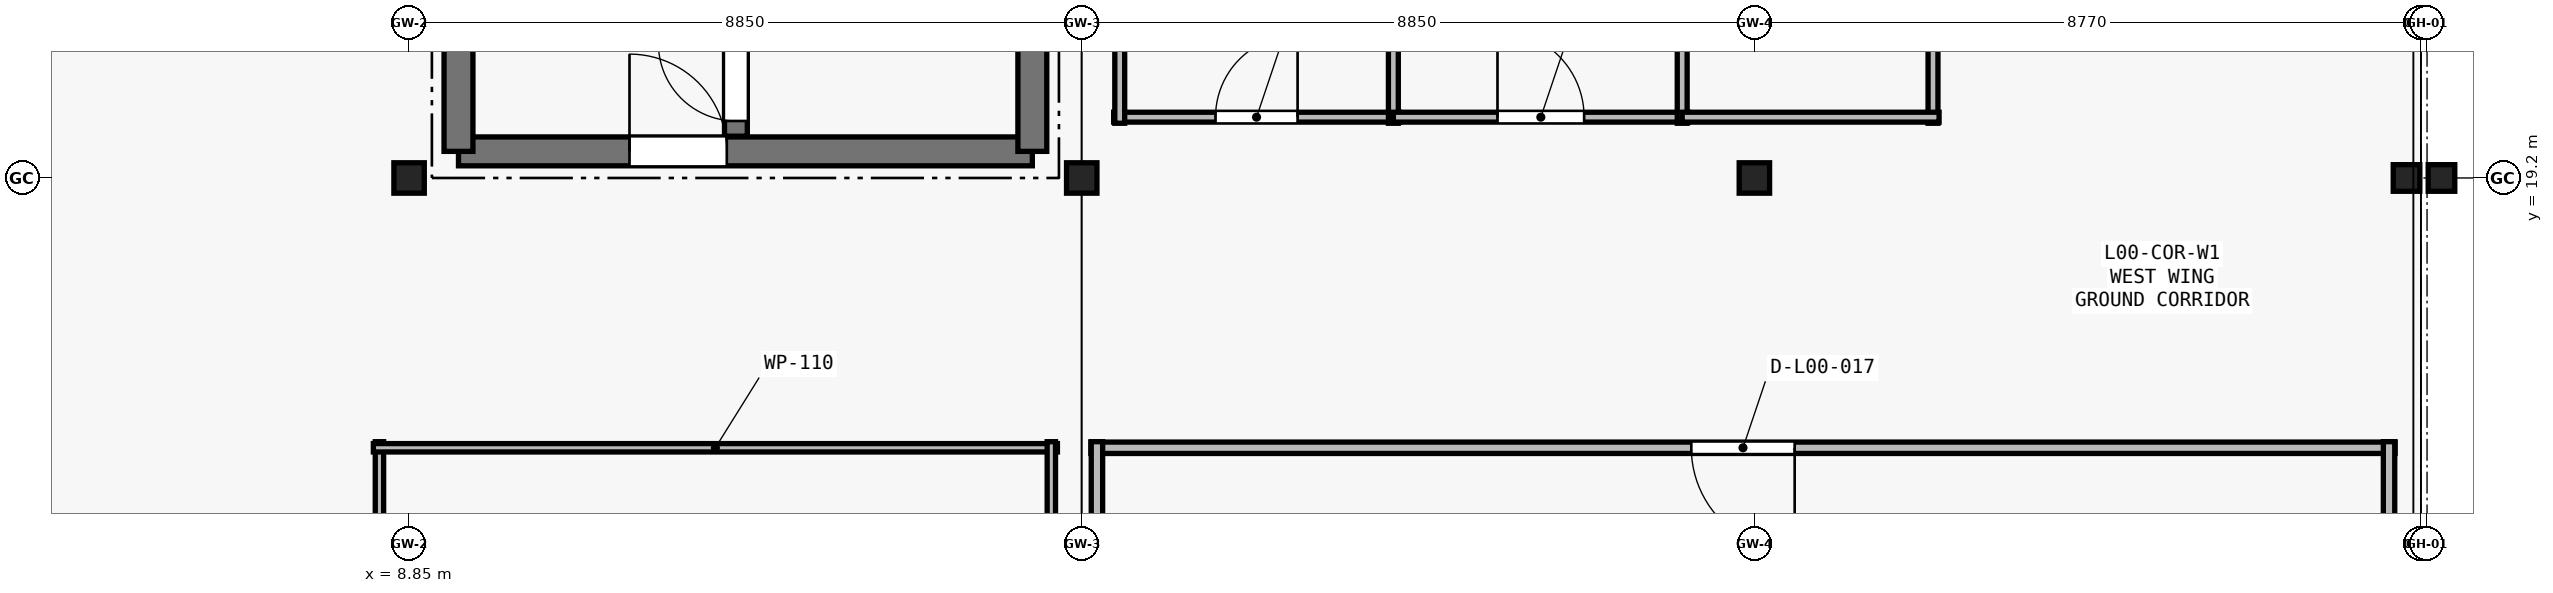
"""IFC4 building model, lengths in metres.
Left out: names, types, materials, properties, quantities, classifications, styles, units other than length and angle.
Written with IfcOpenShell. Run it as: python <this file> out.ifc"""

import sys

from ifc_helpers import new_model, si_unit, direction, frame, frame_2d, origin, origin_2d, place, context, subcontext, project, spatial, rectangle, i_section, extrude, element, fill, save


model = new_model("IFC4")
c1 = context("Model", 3, precision=1e-05, world=origin(), true_north=direction((0.0, 1.0)))
c2 = subcontext(c1, "Body", "Model", "MODEL_VIEW")
j1 = project(units=[si_unit("LENGTHUNIT", "METRE"), si_unit("PLANEANGLEUNIT", "RADIAN")], contexts=[c1])
p1 = place(None, origin())
s1 = spatial("IfcSite", under=j1, at=p1, CompositionType="ELEMENT")
p2 = place(p1, origin())
s2 = spatial("IfcBuilding", under=s1, at=p2, CompositionType="ELEMENT")
p3 = place(p2, origin())
s3 = spatial("IfcBuildingStorey", under=s2, at=p3, CompositionType="ELEMENT", Elevation=0.0)
for number, where, z_axis, x_axis in (
    (1, (8.85, 19.2, 0.0), (0.0, 0.0, 1.0), (1.0, 0.0, 0.0)),
    (2, (17.7, 19.2, 0.0), (0.0, 0.0, 1.0), (1.0, 0.0, 0.0)),
    (3, (26.55, 19.2, 0.0), (0.0, 0.0, 1.0), (1.0, 0.0, 0.0)),
):
    element("IfcColumn", number, at=place(p3, frame(where, z_axis=z_axis, x_axis=x_axis)), inside=s3, PredefinedType="COLUMN", context=c2, shape_type="SweptSolid", body=[
        extrude(i_section(OverallWidth=0.4, OverallDepth=0.4, WebThickness=0.013, FlangeThickness=0.021, FilletRadius=0.022, at=origin_2d()), origin(), (0.0, 0.0, 1.0), 6.0),
    ])
for number, where, z_axis, x_axis in (
    (4, (35.13, 19.2, 0.0), (0.0, 0.0, 1.0), (1.0, 0.0, 0.0)),
    (5, (35.59, 19.2, 0.0), (0.0, 0.0, 1.0), (1.0, 0.0, 0.0)),
):
    element("IfcColumn", number, at=place(p3, frame(where, z_axis=z_axis, x_axis=x_axis)), inside=s3, PredefinedType="COLUMN", context=c2, shape_type="SweptSolid", body=[
        extrude(i_section(OverallWidth=0.35, OverallDepth=0.35, WebThickness=0.012, FlangeThickness=0.019, FilletRadius=0.02, at=origin_2d()), origin(), (0.0, 0.0, 1.0), 6.0),
    ])
p4 = place(p3, frame((9.5, 19.55, 0.0), z_axis=(0.0, 0.0, 1.0), x_axis=(1.0, 0.0, 0.0)))
e6 = element("IfcWall", 6, at=p4, inside=s3, PredefinedType="SHEAR", context=c2, shape_type="SweptSolid", body=[
    extrude(rectangle(XDim=7.55, YDim=0.38, at=frame_2d((3.775, 0.0))), origin(), (0.0, 0.0, 1.0), 6.0),
])
p5 = place(p4, frame((2.25, 0.0, 0.0)))
e7 = element("IfcOpeningElement", 7, at=p5, cuts=e6, PredefinedType="OPENING", context=c2, shape_type="SweptSolid", body=[
    extrude(rectangle(XDim=1.28, YDim=2.15, at=frame_2d((0.64, 1.075))), frame((0.0, 0.2, 0.0), z_axis=(0.0, -1.0, 0.0), x_axis=(1.0, 0.0, 0.0)), (0.0, 0.0, 1.0), 0.4),
])
for number, where, z_axis, x_axis in (
    (8, (9.5, 28.35, 0.0), (0.0, 0.0, 1.0), (0.0, -1.0, 0.0)),
    (9, (17.05, 19.55, 0.0), (0.0, 0.0, 1.0), (0.0, 1.0, 0.0)),
):
    element("IfcWall", number, at=place(p3, frame(where, z_axis=z_axis, x_axis=x_axis)), inside=s3, PredefinedType="SHEAR", context=c2, shape_type="SweptSolid", body=[
        extrude(rectangle(XDim=8.8, YDim=0.38, at=frame_2d((4.4, 0.0))), origin(), (0.0, 0.0, 1.0), 6.0),
    ])
p6 = place(p3, frame((13.15, 19.75, 0.0), z_axis=(0.0, 0.0, 1.0), x_axis=(0.0, 1.0, 0.0)))
e10 = element("IfcWall", 10, at=p6, inside=s3, PredefinedType="SHEAR", context=c2, shape_type="SweptSolid", body=[
    extrude(rectangle(XDim=8.4, YDim=0.3, at=frame_2d((4.2, 0.0))), origin(), (0.0, 0.0, 1.0), 6.0),
])
p7 = place(p6, frame((0.2, 0.0, 0.0)))
e11 = element("IfcOpeningElement", 11, at=p7, cuts=e10, PredefinedType="OPENING", context=c2, shape_type="SweptSolid", body=[
    extrude(rectangle(XDim=1.02, YDim=2.1, at=frame_2d((0.51, 1.05))), frame((0.0, 0.16, 0.0), z_axis=(0.0, -1.0, 0.0), x_axis=(1.0, 0.0, 0.0)), (0.0, 0.0, 1.0), 0.32),
])
p8 = place(p3, frame((18.12, 20.0, 0.0), z_axis=(0.0, 0.0, 1.0), x_axis=(1.0, 0.0, 0.0)))
e12 = element("IfcWall", 12, at=p8, inside=s3, PredefinedType="PARTITIONING", context=c2, shape_type="SweptSolid", body=[
    extrude(rectangle(XDim=3.76, YDim=0.13, at=frame_2d((1.88, 0.0))), origin(), (0.0, 0.0, 1.0), 5.52),
])
p9 = place(p8, frame((1.34, 0.0, 0.0)))
e13 = element("IfcOpeningElement", 13, at=p9, cuts=e12, PredefinedType="OPENING", context=c2, shape_type="SweptSolid", body=[
    extrude(rectangle(XDim=1.08, YDim=2.22, at=frame_2d((0.54, 1.11))), frame((0.0, 0.075, 0.0), z_axis=(0.0, -1.0, 0.0), x_axis=(1.0, 0.0, 0.0)), (0.0, 0.0, 1.0), 0.15),
])
for number, where, z_axis, x_axis in (
    (14, (21.8, 19.92, 0.0), (0.0, 0.0, 1.0), (0.0, 1.0, 0.0)),
    (15, (18.2, 24.08, 0.0), (0.0, 0.0, 1.0), (0.0, -1.0, 0.0)),
):
    element("IfcWall", number, at=place(p3, frame(where, z_axis=z_axis, x_axis=x_axis)), inside=s3, PredefinedType="PARTITIONING", context=c2, shape_type="SweptSolid", body=[
        extrude(rectangle(XDim=4.16, YDim=0.13, at=frame_2d((2.08, 0.0))), origin(), (0.0, 0.0, 1.0), 5.52),
    ])
p10 = place(p3, frame((21.8, 20.0, 0.0), z_axis=(0.0, 0.0, 1.0), x_axis=(1.0, 0.0, 0.0)))
e16 = element("IfcWall", 16, at=p10, inside=s3, PredefinedType="PARTITIONING", context=c2, shape_type="SweptSolid", body=[
    extrude(rectangle(XDim=3.88, YDim=0.13, at=frame_2d((1.94, 0.0))), origin(), (0.0, 0.0, 1.0), 5.52),
])
p11 = place(p10, frame((1.37, 0.0, 0.0)))
e17 = element("IfcOpeningElement", 17, at=p11, cuts=e16, PredefinedType="OPENING", context=c2, shape_type="SweptSolid", body=[
    extrude(rectangle(XDim=1.14, YDim=2.22, at=frame_2d((0.57, 1.11))), frame((0.0, 0.075, 0.0), z_axis=(0.0, -1.0, 0.0), x_axis=(1.0, 0.0, 0.0)), (0.0, 0.0, 1.0), 0.15),
])
p12 = place(p3, frame((25.6, 19.92, 0.0), z_axis=(0.0, 0.0, 1.0), x_axis=(0.0, 1.0, 0.0)))
e18 = element("IfcWall", 18, at=p12, inside=s3, PredefinedType="PARTITIONING", context=c2, shape_type="SweptSolid", body=[
    extrude(rectangle(XDim=4.16, YDim=0.13, at=frame_2d((2.08, 0.0))), origin(), (0.0, 0.0, 1.0), 5.52),
])
p13 = place(p3, frame((28.9, 19.92, 0.0), z_axis=(0.0, 0.0, 1.0), x_axis=(0.0, 1.0, 0.0)))
e19 = element("IfcWall", 19, at=p13, inside=s3, PredefinedType="PARTITIONING", context=c2, shape_type="SweptSolid", body=[
    extrude(rectangle(XDim=4.16, YDim=0.13, at=frame_2d((2.08, 0.0))), origin(), (0.0, 0.0, 1.0), 5.52),
])
p14 = place(p13, frame((1.48, 0.0, 0.0)))
e20 = element("IfcOpeningElement", 20, at=p14, cuts=e19, PredefinedType="OPENING", context=c2, shape_type="SweptSolid", body=[
    extrude(rectangle(XDim=1.2, YDim=2.22, at=frame_2d((0.6, 1.11))), frame((0.0, 0.075, 0.0), z_axis=(0.0, -1.0, 0.0), x_axis=(1.0, 0.0, 0.0)), (0.0, 0.0, 1.0), 0.15),
])
p15 = place(p3, frame((25.6, 20.0, 0.0), z_axis=(0.0, 0.0, 1.0), x_axis=(1.0, 0.0, 0.0)))
e21 = element("IfcWall", 21, at=p15, inside=s3, PredefinedType="PARTITIONING", context=c2, shape_type="SweptSolid", body=[
    extrude(rectangle(XDim=3.38, YDim=0.13, at=frame_2d((1.69, 0.0))), origin(), (0.0, 0.0, 1.0), 5.52),
])
p16 = place(p3, frame((8.46, 15.73, 0.0), z_axis=(0.0, 0.0, 1.0), x_axis=(0.0, -1.0, 0.0)))
e22 = element("IfcWall", 22, at=p16, inside=s3, PredefinedType="PARTITIONING", context=c2, shape_type="SweptSolid", body=[
    extrude(rectangle(XDim=15.53, YDim=0.11, at=frame_2d((7.765, 0.0))), origin(), (0.0, 0.0, 1.0), 5.52),
])
p17 = place(p16, frame((7.125, 0.0, 0.0)))
e23 = element("IfcOpeningElement", 23, at=p17, cuts=e22, PredefinedType="OPENING", context=c2, shape_type="SweptSolid", body=[
    extrude(rectangle(XDim=1.28, YDim=2.15, at=frame_2d((0.64, 1.075))), frame((0.0, 0.065, 0.0), z_axis=(0.0, -1.0, 0.0), x_axis=(1.0, 0.0, 0.0)), (0.0, 0.0, 1.0), 0.13),
])
p18 = place(p3, frame((17.38, 15.65, 0.0), z_axis=(0.0, 0.0, 1.0), x_axis=(-1.0, 0.0, 0.0)))
e24 = element("IfcWall", 24, at=p18, inside=s3, PredefinedType="PARTITIONING", context=c2, shape_type="SweptSolid", body=[
    extrude(rectangle(XDim=9.0, YDim=0.11, at=frame_2d((4.5, 0.0))), origin(), (0.0, 0.0, 1.0), 5.52),
])
p19 = place(p3, frame((17.3, 0.2, 0.0), z_axis=(0.0, 0.0, 1.0), x_axis=(0.0, 1.0, 0.0)))
e25 = element("IfcWall", 25, at=p19, inside=s3, PredefinedType="PARTITIONING", context=c2, shape_type="SweptSolid", body=[
    extrude(rectangle(XDim=15.53, YDim=0.11, at=frame_2d((7.765, 0.0))), origin(), (0.0, 0.0, 1.0), 5.52),
])
p20 = place(p3, frame((34.98, 15.65, 0.0), z_axis=(0.0, 0.0, 1.0), x_axis=(-1.0, 0.0, 0.0)))
e26 = element("IfcWall", 26, at=p20, inside=s3, PredefinedType="PARTITIONING", context=c2, shape_type="SweptSolid", body=[
    extrude(rectangle(XDim=17.16, YDim=0.15, at=frame_2d((8.58, 0.0))), origin(), (0.0, 0.0, 1.0), 5.52),
])
p21 = place(p20, frame((7.9, 0.0, 0.0)))
e27 = element("IfcOpeningElement", 27, at=p21, cuts=e26, PredefinedType="OPENING", context=c2, shape_type="SweptSolid", body=[
    extrude(rectangle(XDim=1.36, YDim=2.15, at=frame_2d((0.68, 1.075))), frame((0.0, 0.085, 0.0), z_axis=(0.0, -1.0, 0.0), x_axis=(1.0, 0.0, 0.0)), (0.0, 0.0, 1.0), 0.17),
])
p22 = place(p3, frame((34.9, 0.2, 0.0), z_axis=(0.0, 0.0, 1.0), x_axis=(0.0, 1.0, 0.0)))
e28 = element("IfcWall", 28, at=p22, inside=s3, PredefinedType="PARTITIONING", context=c2, shape_type="SweptSolid", body=[
    extrude(rectangle(XDim=15.53, YDim=0.15, at=frame_2d((7.765, 0.0))), origin(), (0.0, 0.0, 1.0), 5.2),
])
p23 = place(p3, frame((17.9, 15.73, 0.0), z_axis=(0.0, 0.0, 1.0), x_axis=(0.0, -1.0, 0.0)))
e29 = element("IfcWall", 29, at=p23, inside=s3, PredefinedType="PARTITIONING", context=c2, shape_type="SweptSolid", body=[
    extrude(rectangle(XDim=15.53, YDim=0.15, at=frame_2d((7.765, 0.0))), origin(), (0.0, 0.0, 1.0), 5.215),
])
p24 = place(p5, origin())
e30 = element("IfcDoor", 30, at=p24, inside=s3, OperationType="SINGLE_SWING_LEFT", PredefinedType="DOOR", context=c2, shape_type="SweptSolid", body=[
    extrude(rectangle(XDim=1.28, YDim=2.15, at=frame_2d((0.64, 1.075))), frame((0.0, 0.025, 0.0), z_axis=(0.0, -1.0, 0.0), x_axis=(1.0, 0.0, 0.0)), (0.0, 0.0, 1.0), 0.05),
])
fill(e7, e30)
p25 = place(p7, origin())
e31 = element("IfcDoor", 31, at=p25, inside=s3, OperationType="SINGLE_SWING_RIGHT", PredefinedType="DOOR", context=c2, shape_type="SweptSolid", body=[
    extrude(rectangle(XDim=1.02, YDim=2.1, at=frame_2d((0.51, 1.05))), frame((0.0, 0.025, 0.0), z_axis=(0.0, -1.0, 0.0), x_axis=(1.0, 0.0, 0.0)), (0.0, 0.0, 1.0), 0.05),
])
fill(e11, e31)
p26 = place(p9, origin())
e32 = element("IfcDoor", 32, at=p26, inside=s3, OperationType="SINGLE_SWING_RIGHT", PredefinedType="DOOR", context=c2, shape_type="SweptSolid", body=[
    extrude(rectangle(XDim=1.08, YDim=2.22, at=frame_2d((0.54, 1.11))), frame((0.0, 0.025, 0.0), z_axis=(0.0, -1.0, 0.0), x_axis=(1.0, 0.0, 0.0)), (0.0, 0.0, 1.0), 0.05),
])
fill(e13, e32)
p27 = place(p11, origin())
e33 = element("IfcDoor", 33, at=p27, inside=s3, OperationType="SINGLE_SWING_LEFT", PredefinedType="DOOR", context=c2, shape_type="SweptSolid", body=[
    extrude(rectangle(XDim=1.14, YDim=2.22, at=frame_2d((0.57, 1.11))), frame((0.0, 0.025, 0.0), z_axis=(0.0, -1.0, 0.0), x_axis=(1.0, 0.0, 0.0)), (0.0, 0.0, 1.0), 0.05),
])
fill(e17, e33)
p28 = place(p21, origin())
e34 = element("IfcDoor", 34, at=p28, inside=s3, OperationType="SINGLE_SWING_LEFT", PredefinedType="DOOR", context=c2, shape_type="SweptSolid", body=[
    extrude(rectangle(XDim=1.36, YDim=2.15, at=frame_2d((0.68, 1.075))), frame((0.0, 0.025, 0.0), z_axis=(0.0, -1.0, 0.0), x_axis=(1.0, 0.0, 0.0)), (0.0, 0.0, 1.0), 0.05),
])
fill(e27, e34)
save(model, sys.argv[1])
